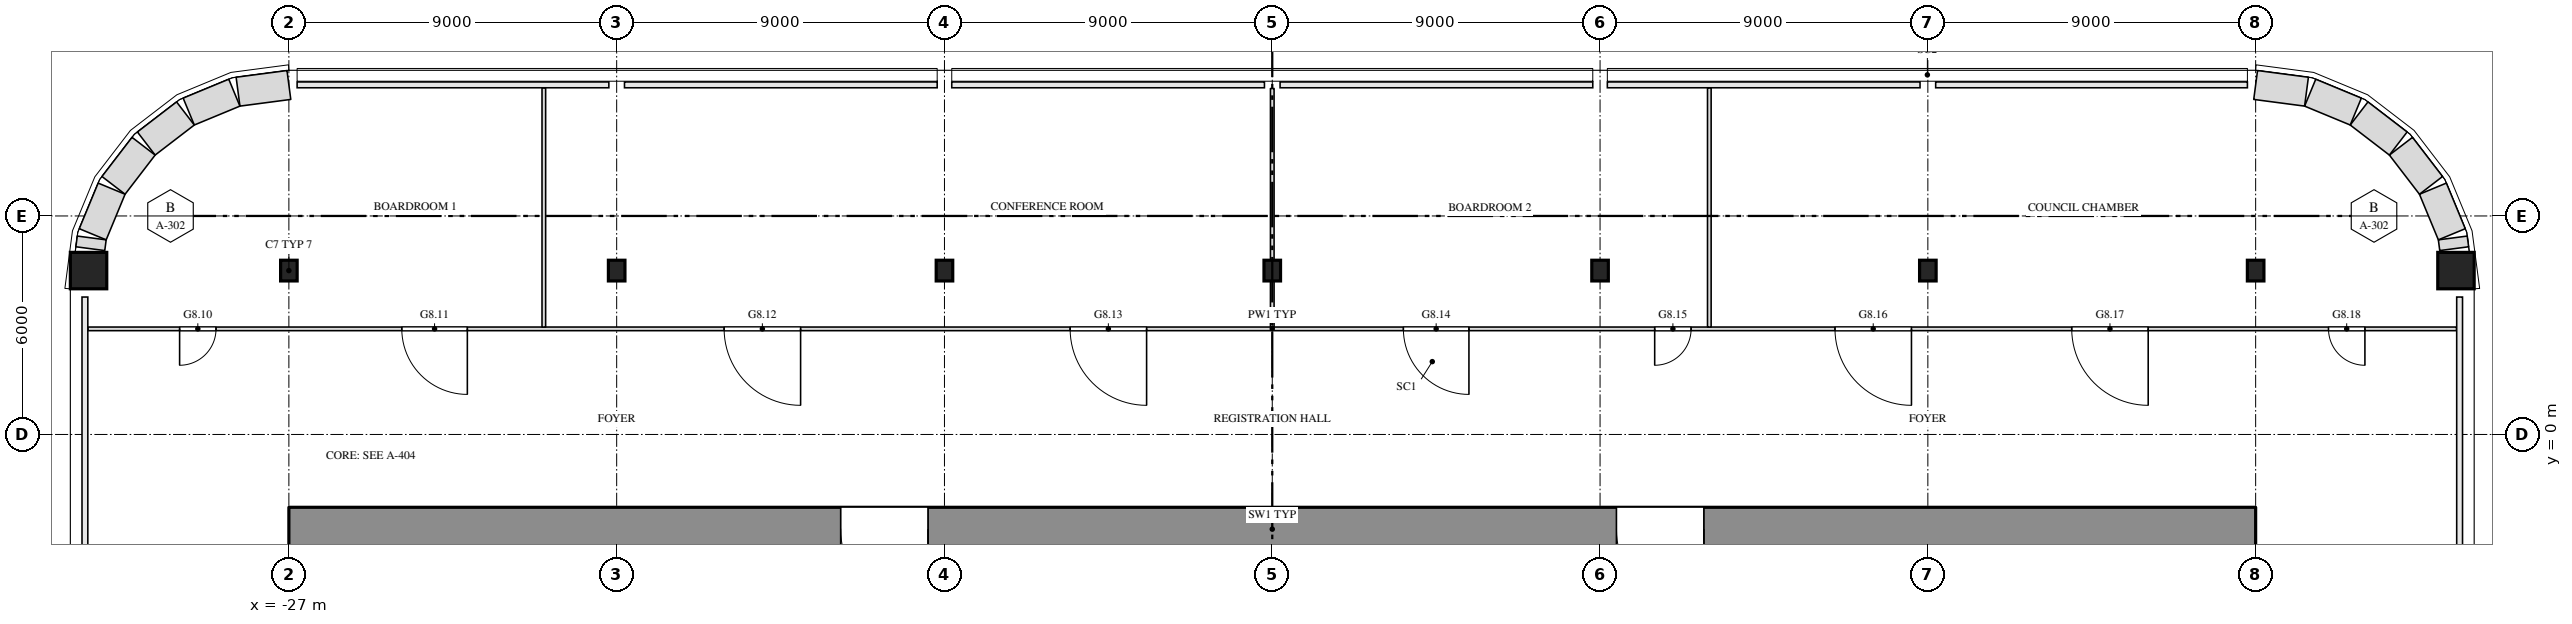
"""IFC4 building model, lengths in metres.
Left out: names, types, materials, properties, quantities, classifications, styles, units other than length and angle.
Written with IfcOpenShell. Run it as: python <this file> out.ifc"""

import sys

from ifc_helpers import new_model, si_unit, direction, frame, frame_2d, origin, origin_2d, place, context, subcontext, project, spatial, rectangle, i_section, extrude, element, fill, save


model = new_model("IFC4")
c1 = context("Model", 3, precision=1e-05, world=origin(), true_north=direction((0.0, 1.0)))
c2 = subcontext(c1, "Body", "Model", "MODEL_VIEW")
j1 = project(units=[si_unit("LENGTHUNIT", "METRE"), si_unit("PLANEANGLEUNIT", "RADIAN")], contexts=[c1])
p1 = place(None, origin())
s1 = spatial("IfcSite", under=j1, at=p1, CompositionType="ELEMENT")
p2 = place(p1, origin())
s2 = spatial("IfcBuilding", under=s1, at=p2, CompositionType="ELEMENT")
p3 = place(p2, frame((0.0, 0.0, 48.0)))
s3 = spatial("IfcBuildingStorey", under=s2, at=p3, CompositionType="ELEMENT", Elevation=48.0)
p4 = place(p3, frame((-32.5, 4.5, 0.0), z_axis=(0.0, 0.0, 1.0), x_axis=(1.0, 0.0, 0.0)))
e1 = element("IfcColumn", 1, at=p4, inside=s3, PredefinedType="COLUMN", context=c2, shape_type="SweptSolid", body=[
    extrude(rectangle(XDim=1.0, YDim=1.0, at=origin_2d()), origin(), (0.0, 0.0, 1.0), 4.5),
])
for number, where, z_axis, x_axis in (
    (2, (-27.0, 4.5, 0.0), (0.0, 0.0, 1.0), (1.0, 0.0, 0.0)),
    (3, (-18.0, 4.5, 0.0), (0.0, 0.0, 1.0), (1.0, 0.0, 0.0)),
    (4, (-9.0, 4.5, 0.0), (0.0, 0.0, 1.0), (1.0, 0.0, 0.0)),
    (5, (0.0, 4.5, 0.0), (0.0, 0.0, 1.0), (1.0, 0.0, 0.0)),
    (6, (9.0, 4.5, 0.0), (0.0, 0.0, 1.0), (1.0, 0.0, 0.0)),
    (7, (18.0, 4.5, 0.0), (0.0, 0.0, 1.0), (1.0, 0.0, 0.0)),
    (8, (27.0, 4.5, 0.0), (0.0, 0.0, 1.0), (1.0, 0.0, 0.0)),
):
    element("IfcColumn", number, at=place(p3, frame(where, z_axis=z_axis, x_axis=x_axis)), inside=s3, PredefinedType="COLUMN", context=c2, shape_type="SweptSolid", body=[
        extrude(i_section(OverallWidth=0.455, OverallDepth=0.569, WebThickness=0.078, FlangeThickness=0.125, at=origin_2d()), origin(), (0.0, 0.0, 1.0), 4.5),
    ])
p5 = place(p3, frame((32.5, 4.5, 0.0), z_axis=(0.0, 0.0, 1.0), x_axis=(1.0, 0.0, 0.0)))
e9 = element("IfcColumn", 9, at=p5, inside=s3, PredefinedType="COLUMN", context=c2, shape_type="SweptSolid", body=[
    extrude(rectangle(XDim=1.0, YDim=1.0, at=origin_2d()), origin(), (0.0, 0.0, 1.0), 4.5),
])
p6 = place(p3, frame((-27.0, -2.6, 0.0), z_axis=(0.0, 0.0, 1.0), x_axis=(1.0, 0.0, 0.0)))
e10 = element("IfcWall", 10, at=p6, inside=s3, PredefinedType="SHEAR", context=c2, shape_type="SweptSolid", body=[
    extrude(rectangle(XDim=54.0, YDim=1.2, at=frame_2d((27.0, 0.0))), origin(), (0.0, 0.0, 1.0), 4.3),
])
p7 = place(p6, frame((15.15, 0.0, 0.0)))
e11 = element("IfcOpeningElement", 11, at=p7, cuts=e10, PredefinedType="OPENING", context=c2, shape_type="SweptSolid", body=[
    extrude(rectangle(XDim=2.4, YDim=2.1, at=frame_2d((1.2, 1.05))), frame((0.0, 0.612, 0.0), z_axis=(0.0, -1.0, 0.0), x_axis=(1.0, 0.0, 0.0)), (0.0, 0.0, 1.0), 1.224),
])
p8 = place(p6, frame((36.45, 0.0, 0.0)))
e12 = element("IfcOpeningElement", 12, at=p8, cuts=e10, PredefinedType="OPENING", context=c2, shape_type="SweptSolid", body=[
    extrude(rectangle(XDim=2.4, YDim=2.1, at=frame_2d((1.2, 1.05))), frame((0.0, 0.612, 0.0), z_axis=(0.0, -1.0, 0.0), x_axis=(1.0, 0.0, 0.0)), (0.0, 0.0, 1.0), 1.224),
])
p9 = place(p3, frame((-32.516, 2.9, 0.0), z_axis=(0.0, 0.0, 1.0), x_axis=(1.0, 0.0, 0.0)))
e13 = element("IfcWall", 13, at=p9, inside=s3, PredefinedType="PARTITIONING", context=c2, shape_type="SweptSolid", body=[
    extrude(rectangle(XDim=65.032, YDim=0.1, at=frame_2d((32.516, 0.0))), origin(), (0.0, 0.0, 1.0), 4.3),
])
p10 = place(p9, frame((2.516, 0.0, 0.0)))
e14 = element("IfcOpeningElement", 14, at=p10, cuts=e13, PredefinedType="OPENING", context=c2, shape_type="SweptSolid", body=[
    extrude(rectangle(XDim=1.0, YDim=2.1, at=frame_2d((0.5, 1.05))), frame((0.0, 0.062, 0.0), z_axis=(0.0, -1.0, 0.0), x_axis=(1.0, 0.0, 0.0)), (0.0, 0.0, 1.0), 0.124),
])
p11 = place(p9, frame((8.616, 0.0, 0.0)))
e15 = element("IfcOpeningElement", 15, at=p11, cuts=e13, PredefinedType="OPENING", context=c2, shape_type="SweptSolid", body=[
    extrude(rectangle(XDim=1.8, YDim=2.1, at=frame_2d((0.9, 1.05))), frame((0.0, 0.062, 0.0), z_axis=(0.0, -1.0, 0.0), x_axis=(1.0, 0.0, 0.0)), (0.0, 0.0, 1.0), 0.124),
])
p12 = place(p9, frame((17.466, 0.0, 0.0)))
e16 = element("IfcOpeningElement", 16, at=p12, cuts=e13, PredefinedType="OPENING", context=c2, shape_type="SweptSolid", body=[
    extrude(rectangle(XDim=2.1, YDim=2.4, at=frame_2d((1.05, 1.2))), frame((0.0, 0.062, 0.0), z_axis=(0.0, -1.0, 0.0), x_axis=(1.0, 0.0, 0.0)), (0.0, 0.0, 1.0), 0.124),
])
p13 = place(p9, frame((26.966, 0.0, 0.0)))
e17 = element("IfcOpeningElement", 17, at=p13, cuts=e13, PredefinedType="OPENING", context=c2, shape_type="SweptSolid", body=[
    extrude(rectangle(XDim=2.1, YDim=2.4, at=frame_2d((1.05, 1.2))), frame((0.0, 0.062, 0.0), z_axis=(0.0, -1.0, 0.0), x_axis=(1.0, 0.0, 0.0)), (0.0, 0.0, 1.0), 0.124),
])
p14 = place(p9, frame((36.116, 0.0, 0.0)))
e18 = element("IfcOpeningElement", 18, at=p14, cuts=e13, PredefinedType="OPENING", context=c2, shape_type="SweptSolid", body=[
    extrude(rectangle(XDim=1.8, YDim=2.1, at=frame_2d((0.9, 1.05))), frame((0.0, 0.062, 0.0), z_axis=(0.0, -1.0, 0.0), x_axis=(1.0, 0.0, 0.0)), (0.0, 0.0, 1.0), 0.124),
])
p15 = place(p9, frame((43.016, 0.0, 0.0)))
e19 = element("IfcOpeningElement", 19, at=p15, cuts=e13, PredefinedType="OPENING", context=c2, shape_type="SweptSolid", body=[
    extrude(rectangle(XDim=1.0, YDim=2.1, at=frame_2d((0.5, 1.05))), frame((0.0, 0.062, 0.0), z_axis=(0.0, -1.0, 0.0), x_axis=(1.0, 0.0, 0.0)), (0.0, 0.0, 1.0), 0.124),
])
p16 = place(p9, frame((47.966, 0.0, 0.0)))
e20 = element("IfcOpeningElement", 20, at=p16, cuts=e13, PredefinedType="OPENING", context=c2, shape_type="SweptSolid", body=[
    extrude(rectangle(XDim=2.1, YDim=2.4, at=frame_2d((1.05, 1.2))), frame((0.0, 0.062, 0.0), z_axis=(0.0, -1.0, 0.0), x_axis=(1.0, 0.0, 0.0)), (0.0, 0.0, 1.0), 0.124),
])
p17 = place(p9, frame((54.466, 0.0, 0.0)))
e21 = element("IfcOpeningElement", 21, at=p17, cuts=e13, PredefinedType="OPENING", context=c2, shape_type="SweptSolid", body=[
    extrude(rectangle(XDim=2.1, YDim=2.4, at=frame_2d((1.05, 1.2))), frame((0.0, 0.062, 0.0), z_axis=(0.0, -1.0, 0.0), x_axis=(1.0, 0.0, 0.0)), (0.0, 0.0, 1.0), 0.124),
])
p18 = place(p9, frame((61.516, 0.0, 0.0)))
e22 = element("IfcOpeningElement", 22, at=p18, cuts=e13, PredefinedType="OPENING", context=c2, shape_type="SweptSolid", body=[
    extrude(rectangle(XDim=1.0, YDim=2.1, at=frame_2d((0.5, 1.05))), frame((0.0, 0.062, 0.0), z_axis=(0.0, -1.0, 0.0), x_axis=(1.0, 0.0, 0.0)), (0.0, 0.0, 1.0), 0.124),
])
p19 = place(p3, frame((-20.0, 2.95, 0.0), z_axis=(0.0, 0.0, 1.0), x_axis=(0.0, 1.0, 0.0)))
e23 = element("IfcWall", 23, at=p19, inside=s3, PredefinedType="PARTITIONING", context=c2, shape_type="SweptSolid", body=[
    extrude(rectangle(XDim=6.566, YDim=0.1, at=frame_2d((3.283, 0.0))), origin(), (0.0, 0.0, 1.0), 4.3),
])
p20 = place(p3, frame((0.0, 2.95, 0.0), z_axis=(0.0, 0.0, 1.0), x_axis=(0.0, 1.0, 0.0)))
e24 = element("IfcWall", 24, at=p20, inside=s3, PredefinedType="PARTITIONING", context=c2, shape_type="SweptSolid", body=[
    extrude(rectangle(XDim=1.266, YDim=0.1, at=frame_2d((0.633, 0.0))), origin(), (0.0, 0.0, 1.0), 4.3),
])
p21 = place(p3, frame((0.0, 4.784, 0.0), z_axis=(0.0, 0.0, 1.0), x_axis=(0.0, 1.0, 0.0)))
e25 = element("IfcWall", 25, at=p21, inside=s3, PredefinedType="PARTITIONING", context=c2, shape_type="SweptSolid", body=[
    extrude(rectangle(XDim=4.716, YDim=0.1, at=frame_2d((2.358, 0.0))), origin(), (0.0, 0.0, 1.0), 3.688),
])
p22 = place(p3, frame((12.0, 2.95, 0.0), z_axis=(0.0, 0.0, 1.0), x_axis=(0.0, 1.0, 0.0)))
e26 = element("IfcWall", 26, at=p22, inside=s3, PredefinedType="PARTITIONING", context=c2, shape_type="SweptSolid", body=[
    extrude(rectangle(XDim=6.566, YDim=0.1, at=frame_2d((3.283, 0.0))), origin(), (0.0, 0.0, 1.0), 4.3),
])
p23 = place(p3, frame((32.451, 5.102, 0.0), z_axis=(0.0, 0.0, 1.0), x_axis=(-0.129901534033, 0.991526899008, 0.0)))
e27 = element("IfcWall", 27, at=p23, inside=s3, PredefinedType="SOLIDWALL", context=c2, shape_type="SweptSolid", body=[
    extrude(rectangle(XDim=0.297, YDim=0.8, at=frame_2d((0.148, 0.0))), origin(), (0.0, 0.0, 1.0), 4.3),
])
p24 = place(p3, frame((32.386, 5.497, 0.0), z_axis=(0.0, 0.0, 1.0), x_axis=(-0.38276009378, 0.923847774587, 0.0)))
e28 = element("IfcWall", 28, at=p24, inside=s3, PredefinedType="SOLIDWALL", context=c2, shape_type="SweptSolid", body=[
    extrude(rectangle(XDim=1.355, YDim=0.8, at=frame_2d((0.678, 0.0))), origin(), (0.0, 0.0, 1.0), 4.3),
])
for number, where, z_axis, x_axis in (
    (29, (31.815, 6.84, 0.0), (0.0, 0.0, 1.0), (-0.609, 0.793, 0.0)),
    (30, (30.916, 7.989, 0.0), (0.0, 0.0, 1.0), (-0.793, 0.609, 0.0)),
):
    element("IfcWall", number, at=place(p3, frame(where, z_axis=z_axis, x_axis=x_axis)), inside=s3, PredefinedType="SOLIDWALL", context=c2, shape_type="SweptSolid", body=[
        extrude(rectangle(XDim=1.356, YDim=0.8, at=frame_2d((0.678, 0.0))), origin(), (0.0, 0.0, 1.0), 4.3),
    ])
p25 = place(p3, frame((29.75, 8.867, 0.0), z_axis=(0.0, 0.0, 1.0), x_axis=(-0.923847774587, 0.38276009378, 0.0)))
e31 = element("IfcWall", 31, at=p25, inside=s3, PredefinedType="SOLIDWALL", context=c2, shape_type="SweptSolid", body=[
    extrude(rectangle(XDim=1.355, YDim=0.8, at=frame_2d((0.678, 0.0))), origin(), (0.0, 0.0, 1.0), 4.3),
])
for number, where, z_axis, x_axis in (
    (32, (28.396, 9.413, 0.0), (0.0, 0.0, 1.0), (-0.991, 0.131, 0.0)),
    (33, (-27.0, 9.597, 0.0), (0.0, 0.0, 1.0), (-0.991, -0.131, 0.0)),
):
    element("IfcWall", number, at=place(p3, frame(where, z_axis=z_axis, x_axis=x_axis)), inside=s3, PredefinedType="SOLIDWALL", context=c2, shape_type="SweptSolid", body=[
        extrude(rectangle(XDim=1.408, YDim=0.8, at=frame_2d((0.704, 0.0))), origin(), (0.0, 0.0, 1.0), 4.3),
    ])
p26 = place(p3, frame((-28.497, 9.386, 0.0), z_axis=(0.0, 0.0, 1.0), x_axis=(-0.923847774587, -0.38276009378, 0.0)))
e34 = element("IfcWall", 34, at=p26, inside=s3, PredefinedType="SOLIDWALL", context=c2, shape_type="SweptSolid", body=[
    extrude(rectangle(XDim=1.355, YDim=0.8, at=frame_2d((0.678, 0.0))), origin(), (0.0, 0.0, 1.0), 4.3),
])
for number, where, z_axis, x_axis in (
    (35, (-29.84, 8.815, 0.0), (0.0, 0.0, 1.0), (-0.793, -0.609, 0.0)),
    (36, (-30.989, 7.916, 0.0), (0.0, 0.0, 1.0), (-0.609, -0.793, 0.0)),
):
    element("IfcWall", number, at=place(p3, frame(where, z_axis=z_axis, x_axis=x_axis)), inside=s3, PredefinedType="SOLIDWALL", context=c2, shape_type="SweptSolid", body=[
        extrude(rectangle(XDim=1.356, YDim=0.8, at=frame_2d((0.678, 0.0))), origin(), (0.0, 0.0, 1.0), 4.3),
    ])
p27 = place(p3, frame((-31.867, 6.75, 0.0), z_axis=(0.0, 0.0, 1.0), x_axis=(-0.38276009378, -0.923847774587, 0.0)))
e37 = element("IfcWall", 37, at=p27, inside=s3, PredefinedType="SOLIDWALL", context=c2, shape_type="SweptSolid", body=[
    extrude(rectangle(XDim=1.355, YDim=0.8, at=frame_2d((0.678, 0.0))), origin(), (0.0, 0.0, 1.0), 4.3),
])
p28 = place(p3, frame((-32.413, 5.396, 0.0), z_axis=(0.0, 0.0, 1.0), x_axis=(-0.129901534033, -0.991526899008, 0.0)))
e38 = element("IfcWall", 38, at=p28, inside=s3, PredefinedType="SOLIDWALL", context=c2, shape_type="SweptSolid", body=[
    extrude(rectangle(XDim=0.297, YDim=0.8, at=frame_2d((0.148, 0.0))), origin(), (0.0, 0.0, 1.0), 4.3),
])
p29 = place(p10, origin())
e39 = element("IfcDoor", 39, at=p29, inside=s3, OperationType="SINGLE_SWING_RIGHT", PredefinedType="DOOR", context=c2, shape_type="SweptSolid", body=[
    extrude(rectangle(XDim=1.0, YDim=2.1, at=frame_2d((0.5, 1.05))), frame((0.0, 0.025, 0.0), z_axis=(0.0, -1.0, 0.0), x_axis=(1.0, 0.0, 0.0)), (0.0, 0.0, 1.0), 0.05),
])
fill(e14, e39)
p30 = place(p11, origin())
e40 = element("IfcDoor", 40, at=p30, inside=s3, OperationType="DOUBLE_DOOR_SINGLE_SWING", PredefinedType="DOOR", context=c2, shape_type="SweptSolid", body=[
    extrude(rectangle(XDim=1.8, YDim=2.1, at=frame_2d((0.9, 1.05))), frame((0.0, 0.025, 0.0), z_axis=(0.0, -1.0, 0.0), x_axis=(1.0, 0.0, 0.0)), (0.0, 0.0, 1.0), 0.05),
])
fill(e15, e40)
p31 = place(p12, origin())
e41 = element("IfcDoor", 41, at=p31, inside=s3, OperationType="DOUBLE_DOOR_SINGLE_SWING", PredefinedType="DOOR", context=c2, shape_type="SweptSolid", body=[
    extrude(rectangle(XDim=2.1, YDim=2.4, at=frame_2d((1.05, 1.2))), frame((0.0, 0.025, 0.0), z_axis=(0.0, -1.0, 0.0), x_axis=(1.0, 0.0, 0.0)), (0.0, 0.0, 1.0), 0.05),
])
fill(e16, e41)
p32 = place(p13, origin())
e42 = element("IfcDoor", 42, at=p32, inside=s3, OperationType="DOUBLE_DOOR_SINGLE_SWING", PredefinedType="DOOR", context=c2, shape_type="SweptSolid", body=[
    extrude(rectangle(XDim=2.1, YDim=2.4, at=frame_2d((1.05, 1.2))), frame((0.0, 0.025, 0.0), z_axis=(0.0, -1.0, 0.0), x_axis=(1.0, 0.0, 0.0)), (0.0, 0.0, 1.0), 0.05),
])
fill(e17, e42)
p33 = place(p14, origin())
e43 = element("IfcDoor", 43, at=p33, inside=s3, OperationType="DOUBLE_DOOR_SINGLE_SWING", PredefinedType="DOOR", context=c2, shape_type="SweptSolid", body=[
    extrude(rectangle(XDim=1.8, YDim=2.1, at=frame_2d((0.9, 1.05))), frame((0.0, 0.025, 0.0), z_axis=(0.0, -1.0, 0.0), x_axis=(1.0, 0.0, 0.0)), (0.0, 0.0, 1.0), 0.05),
])
fill(e18, e43)
p34 = place(p15, origin())
e44 = element("IfcDoor", 44, at=p34, inside=s3, OperationType="SINGLE_SWING_RIGHT", PredefinedType="DOOR", context=c2, shape_type="SweptSolid", body=[
    extrude(rectangle(XDim=1.0, YDim=2.1, at=frame_2d((0.5, 1.05))), frame((0.0, 0.025, 0.0), z_axis=(0.0, -1.0, 0.0), x_axis=(1.0, 0.0, 0.0)), (0.0, 0.0, 1.0), 0.05),
])
fill(e19, e44)
p35 = place(p16, origin())
e45 = element("IfcDoor", 45, at=p35, inside=s3, OperationType="DOUBLE_DOOR_SINGLE_SWING", PredefinedType="DOOR", context=c2, shape_type="SweptSolid", body=[
    extrude(rectangle(XDim=2.1, YDim=2.4, at=frame_2d((1.05, 1.2))), frame((0.0, 0.025, 0.0), z_axis=(0.0, -1.0, 0.0), x_axis=(1.0, 0.0, 0.0)), (0.0, 0.0, 1.0), 0.05),
])
fill(e20, e45)
p36 = place(p17, origin())
e46 = element("IfcDoor", 46, at=p36, inside=s3, OperationType="DOUBLE_DOOR_SINGLE_SWING", PredefinedType="DOOR", context=c2, shape_type="SweptSolid", body=[
    extrude(rectangle(XDim=2.1, YDim=2.4, at=frame_2d((1.05, 1.2))), frame((0.0, 0.025, 0.0), z_axis=(0.0, -1.0, 0.0), x_axis=(1.0, 0.0, 0.0)), (0.0, 0.0, 1.0), 0.05),
])
fill(e21, e46)
p37 = place(p18, origin())
e47 = element("IfcDoor", 47, at=p37, inside=s3, OperationType="SINGLE_SWING_LEFT", PredefinedType="DOOR", context=c2, shape_type="SweptSolid", body=[
    extrude(rectangle(XDim=1.0, YDim=2.1, at=frame_2d((0.5, 1.05))), frame((0.0, 0.025, 0.0), z_axis=(0.0, -1.0, 0.0), x_axis=(1.0, 0.0, 0.0)), (0.0, 0.0, 1.0), 0.05),
])
fill(e22, e47)
p38 = place(p7, origin())
e48 = element("IfcDoor", 48, at=p38, inside=s3, OperationType="DOUBLE_DOOR_SINGLE_SWING", PredefinedType="DOOR", context=c2, shape_type="SweptSolid", body=[
    extrude(rectangle(XDim=2.4, YDim=2.1, at=frame_2d((1.2, 1.05))), frame((0.0, 0.025, 0.0), z_axis=(0.0, -1.0, 0.0), x_axis=(1.0, 0.0, 0.0)), (0.0, 0.0, 1.0), 0.05),
])
fill(e11, e48)
p39 = place(p8, origin())
e49 = element("IfcDoor", 49, at=p39, inside=s3, OperationType="DOUBLE_DOOR_SINGLE_SWING", PredefinedType="DOOR", context=c2, shape_type="SweptSolid", body=[
    extrude(rectangle(XDim=2.4, YDim=2.1, at=frame_2d((1.2, 1.05))), frame((0.0, 0.025, 0.0), z_axis=(0.0, -1.0, 0.0), x_axis=(1.0, 0.0, 0.0)), (0.0, 0.0, 1.0), 0.05),
])
fill(e12, e49)
save(model, sys.argv[1])
